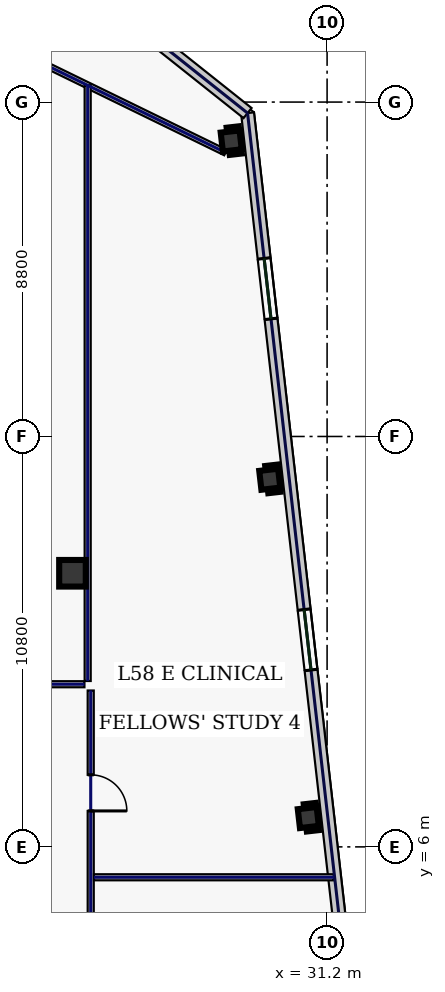
"""IFC4 building model, lengths in metres.
Left out: names, types, materials, properties, quantities, classifications, styles, units other than length and angle.
Written with IfcOpenShell. Run it as: python <this file> out.ifc"""

import sys

from ifc_helpers import new_model, si_unit, direction, frame, frame_2d, origin, origin_2d, place, context, subcontext, project, spatial, rectangle, hollow_rectangle, extrude, element, fill, save


model = new_model("IFC4")
c1 = context("Model", 3, precision=1e-05, world=origin(), true_north=direction((0.0, 1.0)))
c2 = subcontext(c1, "Body", "Model", "MODEL_VIEW")
j1 = project(units=[si_unit("LENGTHUNIT", "METRE"), si_unit("PLANEANGLEUNIT", "RADIAN")], contexts=[c1])
p1 = place(None, origin())
s1 = spatial("IfcSite", under=j1, at=p1, CompositionType="ELEMENT")
p2 = place(p1, origin())
s2 = spatial("IfcBuilding", under=s1, at=p2, CompositionType="ELEMENT")
p3 = place(p2, frame((0.0, 0.0, 251.0)))
s3 = spatial("IfcBuildingStorey", under=s2, at=p3, CompositionType="ELEMENT", Elevation=251.0)
p4 = place(p3, frame((24.5, 13.2, 0.0), z_axis=(0.0, 0.0, 1.0), x_axis=(1.0, 0.0, 0.0)))
e1 = element("IfcColumn", 1, at=p4, inside=s3, PredefinedType="COLUMN", context=c2, shape_type="SweptSolid", body=[
    extrude(hollow_rectangle(XDim=0.7, YDim=0.7, WallThickness=0.032, at=origin_2d()), origin(), (0.0, 0.0, 1.0), 3.74),
])
for number, where, z_axis, x_axis in (
    (2, (30.706, 6.772, 0.0), (0.0, 0.0, 1.0), (0.994, 0.113, 0.0)),
    (3, (29.691, 15.674, 0.0), (0.0, 0.0, 1.0), (0.994, 0.113, 0.0)),
    (4, (28.677, 24.577, 0.0), (0.0, 0.0, 1.0), (0.994, 0.113, 0.0)),
):
    element("IfcColumn", number, at=place(p3, frame(where, z_axis=z_axis, x_axis=x_axis)), inside=s3, PredefinedType="COLUMN", context=c2, shape_type="SweptSolid", body=[
        extrude(hollow_rectangle(XDim=0.5, YDim=0.5, WallThickness=0.025, at=origin_2d()), origin(), (0.0, 0.0, 1.0), 3.74),
    ])
p5 = place(p3, frame((33.318, -11.651, 0.0), z_axis=(0.0, 0.0, 1.0), x_axis=(-0.11320360501, 0.9935718111, 0.0)))
e5 = element("IfcWall", 5, at=p5, inside=s3, PredefinedType="STANDARD", context=c2, shape_type="SweptSolid", body=[
    extrude(rectangle(XDim=37.2, YDim=0.34, at=frame_2d((18.6, 0.0))), origin(), (0.0, 0.0, 1.0), 3.74),
])
p6 = place(p5, frame((3.85, 0.0, 0.58)))
e6 = element("IfcOpeningElement", 6, at=p6, cuts=e5, PredefinedType="OPENING", context=c2, shape_type="SweptSolid", body=[
    extrude(rectangle(XDim=1.6, YDim=2.3, at=frame_2d((0.8, 1.15))), frame((0.0, 0.18, 0.0), z_axis=(0.0, -1.0, 0.0), x_axis=(1.0, 0.0, 0.0)), (0.0, 0.0, 1.0), 0.36),
])
p7 = place(p5, frame((13.15, 0.0, 0.58)))
e7 = element("IfcOpeningElement", 7, at=p7, cuts=e5, PredefinedType="OPENING", context=c2, shape_type="SweptSolid", body=[
    extrude(rectangle(XDim=1.6, YDim=2.3, at=frame_2d((0.8, 1.15))), frame((0.0, 0.18, 0.0), z_axis=(0.0, -1.0, 0.0), x_axis=(1.0, 0.0, 0.0)), (0.0, 0.0, 1.0), 0.36),
])
p8 = place(p5, frame((22.45, 0.0, 0.58)))
e8 = element("IfcOpeningElement", 8, at=p8, cuts=e5, PredefinedType="OPENING", context=c2, shape_type="SweptSolid", body=[
    extrude(rectangle(XDim=1.6, YDim=2.3, at=frame_2d((0.8, 1.15))), frame((0.0, 0.18, 0.0), z_axis=(0.0, -1.0, 0.0), x_axis=(1.0, 0.0, 0.0)), (0.0, 0.0, 1.0), 0.36),
])
p9 = place(p5, frame((31.75, 0.0, 0.58)))
e9 = element("IfcOpeningElement", 9, at=p9, cuts=e5, PredefinedType="OPENING", context=c2, shape_type="SweptSolid", body=[
    extrude(rectangle(XDim=1.6, YDim=2.3, at=frame_2d((0.8, 1.15))), frame((0.0, 0.18, 0.0), z_axis=(0.0, -1.0, 0.0), x_axis=(1.0, 0.0, 0.0)), (0.0, 0.0, 1.0), 0.36),
])
p10 = place(p3, frame((29.107, 25.31, 0.0), z_axis=(0.0, 0.0, 1.0), x_axis=(-0.78259733853, 0.62252823689, 0.0)))
e10 = element("IfcWall", 10, at=p10, inside=s3, PredefinedType="STANDARD", context=c2, shape_type="SweptSolid", body=[
    extrude(rectangle(XDim=6.548, YDim=0.34, at=frame_2d((3.274, 0.0))), origin(), (0.0, 0.0, 1.0), 3.74),
])
p11 = place(p3, frame((28.528, 24.271, 0.0), z_axis=(0.0, 0.0, 1.0), x_axis=(-0.898820692789, 0.438316509173, 0.0)))
e11 = element("IfcWall", 11, at=p11, inside=s3, PredefinedType="PARTITIONING", context=c2, shape_type="SweptSolid", body=[
    extrude(rectangle(XDim=6.107, YDim=0.16, at=frame_2d((3.053, 0.0))), origin(), (0.0, 0.0, 1.0), 3.74),
])
p12 = place(p3, frame((-24.815, 10.28, 0.0), z_axis=(0.0, 0.0, 1.0), x_axis=(1.0, 0.0, 0.0)))
e12 = element("IfcWall", 12, at=p12, inside=s3, PredefinedType="PARTITIONING", context=c2, shape_type="SweptSolid", body=[
    extrude(rectangle(XDim=49.63, YDim=0.16, at=frame_2d((24.815, 0.0))), origin(), (0.0, 0.0, 1.0), 3.74),
])
p13 = place(p12, frame((1.869, 0.0, 0.0)))
e13 = element("IfcOpeningElement", 13, at=p13, cuts=e12, PredefinedType="OPENING", context=c2, shape_type="SweptSolid", body=[
    extrude(rectangle(XDim=1.3, YDim=2.2, at=frame_2d((0.65, 1.1))), frame((0.0, 0.09, 0.0), z_axis=(0.0, -1.0, 0.0), x_axis=(1.0, 0.0, 0.0)), (0.0, 0.0, 1.0), 0.18),
])
p14 = place(p12, frame((7.288, 0.0, 0.0)))
e14 = element("IfcOpeningElement", 14, at=p14, cuts=e12, PredefinedType="OPENING", context=c2, shape_type="SweptSolid", body=[
    extrude(rectangle(XDim=1.05, YDim=2.2, at=frame_2d((0.525, 1.1))), frame((0.0, 0.09, 0.0), z_axis=(0.0, -1.0, 0.0), x_axis=(1.0, 0.0, 0.0)), (0.0, 0.0, 1.0), 0.18),
])
p15 = place(p12, frame((12.887, 0.0, 0.0)))
e15 = element("IfcOpeningElement", 15, at=p15, cuts=e12, PredefinedType="OPENING", context=c2, shape_type="SweptSolid", body=[
    extrude(rectangle(XDim=1.3, YDim=2.2, at=frame_2d((0.65, 1.1))), frame((0.0, 0.09, 0.0), z_axis=(0.0, -1.0, 0.0), x_axis=(1.0, 0.0, 0.0)), (0.0, 0.0, 1.0), 0.18),
])
p16 = place(p12, frame((19.53, 0.0, 0.0)))
e16 = element("IfcOpeningElement", 16, at=p16, cuts=e12, PredefinedType="OPENING", context=c2, shape_type="SweptSolid", body=[
    extrude(rectangle(XDim=0.95, YDim=2.2, at=frame_2d((0.475, 1.1))), frame((0.0, 0.09, 0.0), z_axis=(0.0, -1.0, 0.0), x_axis=(1.0, 0.0, 0.0)), (0.0, 0.0, 1.0), 0.18),
])
p17 = place(p12, frame((27.383, 0.0, 0.0)))
e17 = element("IfcOpeningElement", 17, at=p17, cuts=e12, PredefinedType="OPENING", context=c2, shape_type="SweptSolid", body=[
    extrude(rectangle(XDim=0.95, YDim=2.2, at=frame_2d((0.475, 1.1))), frame((0.0, 0.09, 0.0), z_axis=(0.0, -1.0, 0.0), x_axis=(1.0, 0.0, 0.0)), (0.0, 0.0, 1.0), 0.18),
])
p18 = place(p12, frame((34.853, 0.0, 0.0)))
e18 = element("IfcOpeningElement", 18, at=p18, cuts=e12, PredefinedType="OPENING", context=c2, shape_type="SweptSolid", body=[
    extrude(rectangle(XDim=1.3, YDim=2.2, at=frame_2d((0.65, 1.1))), frame((0.0, 0.09, 0.0), z_axis=(0.0, -1.0, 0.0), x_axis=(1.0, 0.0, 0.0)), (0.0, 0.0, 1.0), 0.18),
])
p19 = place(p12, frame((41.475, 0.0, 0.0)))
e19 = element("IfcOpeningElement", 19, at=p19, cuts=e12, PredefinedType="OPENING", context=c2, shape_type="SweptSolid", body=[
    extrude(rectangle(XDim=1.3, YDim=2.2, at=frame_2d((0.65, 1.1))), frame((0.0, 0.09, 0.0), z_axis=(0.0, -1.0, 0.0), x_axis=(1.0, 0.0, 0.0)), (0.0, 0.0, 1.0), 0.18),
])
p20 = place(p12, frame((46.806, 0.0, 0.0)))
e20 = element("IfcOpeningElement", 20, at=p20, cuts=e12, PredefinedType="OPENING", context=c2, shape_type="SweptSolid", body=[
    extrude(rectangle(XDim=0.95, YDim=2.2, at=frame_2d((0.475, 1.1))), frame((0.0, 0.09, 0.0), z_axis=(0.0, -1.0, 0.0), x_axis=(1.0, 0.0, 0.0)), (0.0, 0.0, 1.0), 0.18),
])
p21 = place(p3, frame((24.98, 10.115, 0.0), z_axis=(0.0, 0.0, 1.0), x_axis=(0.0, -1.0, 0.0)))
e21 = element("IfcWall", 21, at=p21, inside=s3, PredefinedType="PARTITIONING", context=c2, shape_type="SweptSolid", body=[
    extrude(rectangle(XDim=20.13, YDim=0.16, at=frame_2d((10.065, 0.0))), origin(), (0.0, 0.0, 1.0), 3.74),
])
p22 = place(p21, frame((17.181, 0.0, 0.0)))
e22 = element("IfcOpeningElement", 22, at=p22, cuts=e21, PredefinedType="OPENING", context=c2, shape_type="SweptSolid", body=[
    extrude(rectangle(XDim=0.95, YDim=2.2, at=frame_2d((0.475, 1.1))), frame((0.0, 0.09, 0.0), z_axis=(0.0, -1.0, 0.0), x_axis=(1.0, 0.0, 0.0)), (0.0, 0.0, 1.0), 0.18),
])
p23 = place(p21, frame((12.325, 0.0, 0.0)))
e23 = element("IfcOpeningElement", 23, at=p23, cuts=e21, PredefinedType="OPENING", context=c2, shape_type="SweptSolid", body=[
    extrude(rectangle(XDim=0.95, YDim=2.2, at=frame_2d((0.475, 1.1))), frame((0.0, 0.09, 0.0), z_axis=(0.0, -1.0, 0.0), x_axis=(1.0, 0.0, 0.0)), (0.0, 0.0, 1.0), 0.18),
])
p24 = place(p21, frame((7.125, 0.0, 0.0)))
e24 = element("IfcOpeningElement", 24, at=p24, cuts=e21, PredefinedType="OPENING", context=c2, shape_type="SweptSolid", body=[
    extrude(rectangle(XDim=0.95, YDim=2.2, at=frame_2d((0.475, 1.1))), frame((0.0, 0.09, 0.0), z_axis=(0.0, -1.0, 0.0), x_axis=(1.0, 0.0, 0.0)), (0.0, 0.0, 1.0), 0.18),
])
p25 = place(p21, frame((2.219, 0.0, 0.0)))
e25 = element("IfcOpeningElement", 25, at=p25, cuts=e21, PredefinedType="OPENING", context=c2, shape_type="SweptSolid", body=[
    extrude(rectangle(XDim=0.95, YDim=2.2, at=frame_2d((0.475, 1.1))), frame((0.0, 0.09, 0.0), z_axis=(0.0, -1.0, 0.0), x_axis=(1.0, 0.0, 0.0)), (0.0, 0.0, 1.0), 0.18),
])
p26 = place(p3, frame((24.9, 10.365, 0.0), z_axis=(0.0, 0.0, 1.0), x_axis=(0.0, 1.0, 0.0)))
e26 = element("IfcWall", 26, at=p26, inside=s3, PredefinedType="PARTITIONING", context=c2, shape_type="SweptSolid", body=[
    extrude(rectangle(XDim=15.679, YDim=0.16, at=frame_2d((7.84, 0.0))), origin(), (0.0, 0.0, 1.0), 3.74),
])
p27 = place(p3, frame((25.065, 5.2, 0.0), z_axis=(0.0, 0.0, 1.0), x_axis=(1.0, 0.0, 0.0)))
e27 = element("IfcWall", 27, at=p27, inside=s3, PredefinedType="PARTITIONING", context=c2, shape_type="SweptSolid", body=[
    extrude(rectangle(XDim=6.313, YDim=0.16, at=frame_2d((3.157, 0.0))), origin(), (0.0, 0.0, 1.0), 3.74),
])
p28 = place(p8, origin())
e28 = element("IfcWindow", 28, at=p28, inside=s3, PartitioningType="SINGLE_PANEL", PredefinedType="WINDOW", context=c2, shape_type="SweptSolid", body=[
    extrude(rectangle(XDim=1.6, YDim=2.3, at=frame_2d((0.8, 1.15))), frame((0.0, 0.03, 0.0), z_axis=(0.0, -1.0, 0.0), x_axis=(1.0, 0.0, 0.0)), (0.0, 0.0, 1.0), 0.06),
])
fill(e8, e28)
p29 = place(p9, origin())
e29 = element("IfcWindow", 29, at=p29, inside=s3, PartitioningType="SINGLE_PANEL", PredefinedType="WINDOW", context=c2, shape_type="SweptSolid", body=[
    extrude(rectangle(XDim=1.6, YDim=2.3, at=frame_2d((0.8, 1.15))), frame((0.0, 0.03, 0.0), z_axis=(0.0, -1.0, 0.0), x_axis=(1.0, 0.0, 0.0)), (0.0, 0.0, 1.0), 0.06),
])
fill(e9, e29)
p30 = place(p25, origin())
e30 = element("IfcDoor", 30, at=p30, inside=s3, OperationType="SINGLE_SWING_RIGHT", PredefinedType="DOOR", context=c2, shape_type="SweptSolid", body=[
    extrude(rectangle(XDim=0.95, YDim=2.2, at=frame_2d((0.475, 1.1))), frame((0.0, 0.025, 0.0), z_axis=(0.0, -1.0, 0.0), x_axis=(1.0, 0.0, 0.0)), (0.0, 0.0, 1.0), 0.05),
])
fill(e25, e30)
save(model, sys.argv[1])
